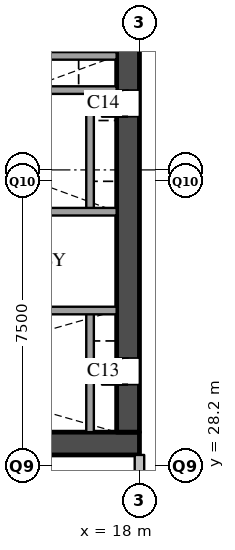
"""IFC4 building model, lengths in metres.
Left out: names, types, materials, properties, quantities, classifications, styles, units other than length and angle.
Written with IfcOpenShell. Run it as: python <this file> out.ifc"""

import sys

from ifc_helpers import new_model, si_unit, direction, frame, frame_2d, origin, place, context, subcontext, project, spatial, rectangle, extrude, element, fill, save


model = new_model("IFC4")
c1 = context("Model", 3, precision=1e-05, world=origin(), true_north=direction((0.0, 1.0)))
c2 = subcontext(c1, "Body", "Model", "MODEL_VIEW")
j1 = project(units=[si_unit("LENGTHUNIT", "METRE"), si_unit("PLANEANGLEUNIT", "RADIAN")], contexts=[c1])
p1 = place(None, origin())
s1 = spatial("IfcSite", under=j1, at=p1, CompositionType="ELEMENT")
p2 = place(p1, origin())
s2 = spatial("IfcBuilding", under=s1, at=p2, CompositionType="ELEMENT")
p3 = place(p2, frame((0.0, 0.0, 26.0)))
s3 = spatial("IfcBuildingStorey", under=s2, at=p3, CompositionType="ELEMENT", Elevation=26.0)
p4 = place(p3, frame((5.6, 28.8, 0.0), z_axis=(0.0, 0.0, 1.0), x_axis=(1.0, 0.0, 0.0)))
e1 = element("IfcWall", 1, at=p4, inside=s3, PredefinedType="SHEAR", context=c2, shape_type="SweptSolid", body=[
    extrude(rectangle(XDim=12.4, YDim=0.6, at=frame_2d((6.2, 0.0))), origin(), (0.0, 0.0, 1.0), 4.7),
])
p5 = place(p3, frame((17.7, 29.1, 0.0), z_axis=(0.0, 0.0, 1.0), x_axis=(0.0, 1.0, 0.0)))
e2 = element("IfcWall", 2, at=p5, inside=s3, PredefinedType="SHEAR", context=c2, shape_type="SweptSolid", body=[
    extrude(rectangle(XDim=20.3, YDim=0.6, at=frame_2d((10.15, 0.0))), origin(), (0.0, 0.0, 1.0), 4.7),
])
p6 = place(p5, frame((1.25, 0.0, 0.0)))
e3 = element("IfcOpeningElement", 3, at=p6, cuts=e2, PredefinedType="OPENING", context=c2, shape_type="SweptSolid", body=[
    extrude(rectangle(XDim=0.7, YDim=2.1, at=frame_2d((0.35, 1.05))), frame((0.0, 0.31, 0.0), z_axis=(0.0, -1.0, 0.0), x_axis=(1.0, 0.0, 0.0)), (0.0, 0.0, 1.0), 0.62),
])
p7 = place(p5, frame((8.3, 0.0, 0.0)))
e4 = element("IfcOpeningElement", 4, at=p7, cuts=e2, PredefinedType="OPENING", context=c2, shape_type="SweptSolid", body=[
    extrude(rectangle(XDim=0.7, YDim=2.1, at=frame_2d((0.35, 1.05))), frame((0.0, 0.31, 0.0), z_axis=(0.0, -1.0, 0.0), x_axis=(1.0, 0.0, 0.0)), (0.0, 0.0, 1.0), 0.62),
])
p8 = place(p3, frame((16.7, 29.1, 0.0), z_axis=(0.0, 0.0, 1.0), x_axis=(0.0, 1.0, 0.0)))
e5 = element("IfcWall", 5, at=p8, inside=s3, PredefinedType="SOLIDWALL", context=c2, shape_type="SweptSolid", body=[
    extrude(rectangle(XDim=3.2, YDim=0.2, at=frame_2d((1.6, 0.0))), origin(), (0.0, 0.0, 1.0), 4.7),
])
p9 = place(p3, frame((16.7, 34.9, 0.0), z_axis=(0.0, 0.0, 1.0), x_axis=(0.0, 1.0, 0.0)))
e6 = element("IfcWall", 6, at=p9, inside=s3, PredefinedType="SOLIDWALL", context=c2, shape_type="SweptSolid", body=[
    extrude(rectangle(XDim=3.2, YDim=0.2, at=frame_2d((1.6, 0.0))), origin(), (0.0, 0.0, 1.0), 4.7),
])
for number, where, z_axis, x_axis in (
    (7, (6.2, 32.3, 0.0), (0.0, 0.0, 1.0), (1.0, 0.0, 0.0)),
    (8, (6.2, 34.9, 0.0), (0.0, 0.0, 1.0), (1.0, 0.0, 0.0)),
    (9, (6.2, 38.1, 0.0), (0.0, 0.0, 1.0), (1.0, 0.0, 0.0)),
):
    element("IfcWall", number, at=place(p3, frame(where, z_axis=z_axis, x_axis=x_axis)), inside=s3, PredefinedType="SOLIDWALL", context=c2, shape_type="SweptSolid", body=[
        extrude(rectangle(XDim=11.2, YDim=0.2, at=frame_2d((5.6, 0.0))), origin(), (0.0, 0.0, 1.0), 4.7),
    ])
p10 = place(p3, frame((12.5, 39.0, 0.0), z_axis=(0.0, 0.0, 1.0), x_axis=(1.0, 0.0, 0.0)))
e10 = element("IfcWall", 10, at=p10, inside=s3, PredefinedType="SOLIDWALL", context=c2, shape_type="SweptSolid", body=[
    extrude(rectangle(XDim=4.9, YDim=0.2, at=frame_2d((2.45, 0.0))), origin(), (0.0, 0.0, 1.0), 4.7),
])
p11 = place(p3, frame((18.0, 22.5, 0.0), z_axis=(0.0, 0.0, 1.0), x_axis=(0.0, 1.0, 0.0)))
e11 = element("IfcWall", 11, at=p11, inside=s3, PredefinedType="PARTITIONING", context=c2, shape_type="SweptSolid", body=[
    extrude(rectangle(XDim=6.0, YDim=0.25, at=frame_2d((3.0, 0.0))), origin(), (0.0, 0.0, 1.0), 4.7),
])
p12 = place(p6, origin())
e12 = element("IfcDoor", 12, at=p12, inside=s3, OperationType="SINGLE_SWING_LEFT", PredefinedType="DOOR", context=c2, shape_type="SweptSolid", body=[
    extrude(rectangle(XDim=0.7, YDim=2.1, at=frame_2d((0.35, 1.05))), frame((0.0, 0.025, 0.0), z_axis=(0.0, -1.0, 0.0), x_axis=(1.0, 0.0, 0.0)), (0.0, 0.0, 1.0), 0.05),
])
fill(e3, e12)
p13 = place(p7, origin())
e13 = element("IfcDoor", 13, at=p13, inside=s3, OperationType="SINGLE_SWING_LEFT", PredefinedType="DOOR", context=c2, shape_type="SweptSolid", body=[
    extrude(rectangle(XDim=0.7, YDim=2.1, at=frame_2d((0.35, 1.05))), frame((0.0, 0.025, 0.0), z_axis=(0.0, -1.0, 0.0), x_axis=(1.0, 0.0, 0.0)), (0.0, 0.0, 1.0), 0.05),
])
fill(e4, e13)
save(model, sys.argv[1])
